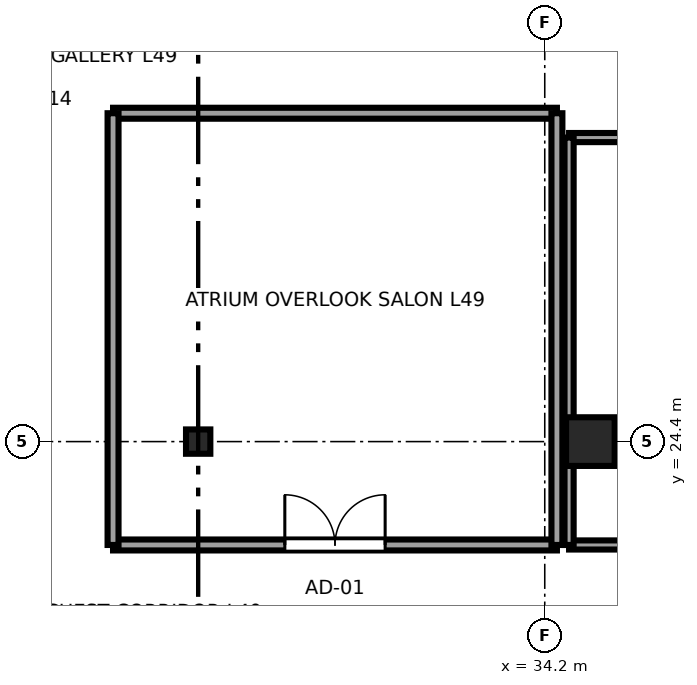
"""IFC4 building model, lengths in metres.
Left out: names, types, materials, properties, quantities, classifications, styles, units other than length and angle.
Written with IfcOpenShell. Run it as: python <this file> out.ifc"""

import sys

from ifc_helpers import new_model, si_unit, direction, frame, frame_2d, origin, origin_2d, place, context, subcontext, project, spatial, rectangle, i_section, extrude, source, transform, mapped, element, fill, save


model = new_model("IFC4")
c1 = context("Model", 3, precision=1e-05, world=origin(), true_north=direction((0.0, 1.0)))
c2 = subcontext(c1, "Body", "Model", "MODEL_VIEW")
j1 = project(units=[si_unit("LENGTHUNIT", "METRE"), si_unit("PLANEANGLEUNIT", "RADIAN")], contexts=[c1])
p1 = place(None, origin())
s1 = spatial("IfcSite", under=j1, at=p1, CompositionType="ELEMENT")
p2 = place(p1, origin())
s2 = spatial("IfcBuilding", under=s1, at=p2, CompositionType="ELEMENT")
p3 = place(p2, frame((0.0, 0.0, 187.55)))
s3 = spatial("IfcBuildingStorey", under=s2, at=p3, CompositionType="ELEMENT", Elevation=187.55)
m1 = source(origin(), c2, "Body", "SweptSolid", [
    extrude(rectangle(XDim=0.8, YDim=0.8, at=origin_2d()), origin(), (0.0, 0.0, 1.0), 3.55),
])
p4 = place(p3, frame((34.95, 24.4, 0.0), z_axis=(0.0, 0.0, 1.0), x_axis=(1.0, 0.0, 0.0)))
e1 = element("IfcColumn", 1, at=p4, inside=s3, PredefinedType="COLUMN", context=c2, shape_type="MappedRepresentation", body=[
    mapped(m1, transform((0.0, 0.0, 0.0), x_axis=(1.0, 0.0, 0.0), y_axis=(0.0, 1.0, 0.0), z_axis=(0.0, 0.0, 1.0), scale=1.0)),
])
m2 = source(origin(), c2, "Body", "SweptSolid", [
    extrude(i_section(OverallWidth=0.4, OverallDepth=0.4, WebThickness=0.02, FlangeThickness=0.035, at=origin_2d()), origin(), (0.0, 0.0, 1.0), 3.55),
])
p5 = place(p3, frame((28.5, 24.4, 0.0), z_axis=(0.0, 0.0, 1.0), x_axis=(1.0, 0.0, 0.0)))
e2 = element("IfcColumn", 2, at=p5, inside=s3, PredefinedType="COLUMN", context=c2, shape_type="MappedRepresentation", body=[
    mapped(m2, transform((0.0, 0.0, 0.0), x_axis=(1.0, 0.0, 0.0), y_axis=(0.0, 1.0, 0.0), z_axis=(0.0, 0.0, 1.0), scale=1.0)),
])
p6 = place(p3, frame((27.1, 22.7, 0.0), z_axis=(0.0, 0.0, 1.0), x_axis=(1.0, 0.0, 0.0)))
e3 = element("IfcWall", 3, at=p6, inside=s3, PredefinedType="PARTITIONING", context=c2, shape_type="SweptSolid", body=[
    extrude(rectangle(XDim=7.3, YDim=0.18, at=frame_2d((3.65, 0.0))), origin(), (0.0, 0.0, 1.0), 3.37),
])
p7 = place(p6, frame((2.825, 0.0, 0.0)))
e4 = element("IfcOpeningElement", 4, at=p7, cuts=e3, PredefinedType="OPENING", context=c2, shape_type="SweptSolid", body=[
    extrude(rectangle(XDim=1.65, YDim=2.15, at=frame_2d((0.825, 1.075))), frame((0.0, 0.1, 0.0), z_axis=(0.0, -1.0, 0.0), x_axis=(1.0, 0.0, 0.0)), (0.0, 0.0, 1.0), 0.2),
])
p8 = place(p3, frame((27.1, 29.8, 0.0), z_axis=(0.0, 0.0, 1.0), x_axis=(1.0, 0.0, 0.0)))
e5 = element("IfcWall", 5, at=p8, inside=s3, PredefinedType="PARTITIONING", context=c2, shape_type="SweptSolid", body=[
    extrude(rectangle(XDim=7.3, YDim=0.18, at=frame_2d((3.65, 0.0))), origin(), (0.0, 0.0, 1.0), 3.37),
])
for number, where, z_axis, x_axis in (
    (6, (27.1, 22.7, 0.0), (0.0, 0.0, 1.0), (0.0, 1.0, 0.0)),
    (7, (34.4, 22.7, 0.0), (0.0, 0.0, 1.0), (0.0, 1.0, 0.0)),
):
    element("IfcWall", number, at=place(p3, frame(where, z_axis=z_axis, x_axis=x_axis)), inside=s3, PredefinedType="PARTITIONING", context=c2, shape_type="SweptSolid", body=[
        extrude(rectangle(XDim=7.1, YDim=0.18, at=frame_2d((3.55, 0.0))), origin(), (0.0, 0.0, 1.0), 3.37),
    ])
p9 = place(p3, frame((34.6, 22.7, 0.0), z_axis=(0.0, 0.0, 1.0), x_axis=(1.0, 0.0, 0.0)))
e8 = element("IfcWall", 8, at=p9, inside=s3, PredefinedType="PARTITIONING", context=c2, shape_type="SweptSolid", body=[
    extrude(rectangle(XDim=7.5, YDim=0.15, at=frame_2d((3.75, 0.0))), origin(), (0.0, 0.0, 1.0), 3.37),
])
p10 = place(p9, frame((2.925, 0.0, 0.0)))
e9 = element("IfcOpeningElement", 9, at=p10, cuts=e8, PredefinedType="OPENING", context=c2, shape_type="SweptSolid", body=[
    extrude(rectangle(XDim=1.65, YDim=2.15, at=frame_2d((0.825, 1.075))), frame((0.0, 0.085, 0.0), z_axis=(0.0, -1.0, 0.0), x_axis=(1.0, 0.0, 0.0)), (0.0, 0.0, 1.0), 0.17),
])
p11 = place(p3, frame((34.6, 29.4, 0.0), z_axis=(0.0, 0.0, 1.0), x_axis=(1.0, 0.0, 0.0)))
e10 = element("IfcWall", 10, at=p11, inside=s3, PredefinedType="PARTITIONING", context=c2, shape_type="SweptSolid", body=[
    extrude(rectangle(XDim=7.5, YDim=0.15, at=frame_2d((3.75, 0.0))), origin(), (0.0, 0.0, 1.0), 3.37),
])
p12 = place(p3, frame((34.6, 22.7, 0.0), z_axis=(0.0, 0.0, 1.0), x_axis=(0.0, 1.0, 0.0)))
e11 = element("IfcWall", 11, at=p12, inside=s3, PredefinedType="PARTITIONING", context=c2, shape_type="SweptSolid", body=[
    extrude(rectangle(XDim=6.7, YDim=0.15, at=frame_2d((3.35, 0.0))), origin(), (0.0, 0.0, 1.0), 3.37),
])
m3 = source(origin(), c2, "Body", "SweptSolid", [
    extrude(rectangle(XDim=1.65, YDim=2.15, at=frame_2d((0.825, 1.075))), frame((0.0, 0.025, 0.0), z_axis=(0.0, -1.0, 0.0), x_axis=(1.0, 0.0, 0.0)), (0.0, 0.0, 1.0), 0.05),
])
p13 = place(p7, origin())
e12 = element("IfcDoor", 12, at=p13, inside=s3, OperationType="DOUBLE_DOOR_SINGLE_SWING", PredefinedType="DOOR", context=c2, shape_type="MappedRepresentation", body=[
    mapped(m3, transform((0.0, 0.0, 0.0), x_axis=(1.0, 0.0, 0.0), y_axis=(0.0, 1.0, 0.0), z_axis=(0.0, 0.0, 1.0), scale=1.0)),
])
fill(e4, e12)
save(model, sys.argv[1])
